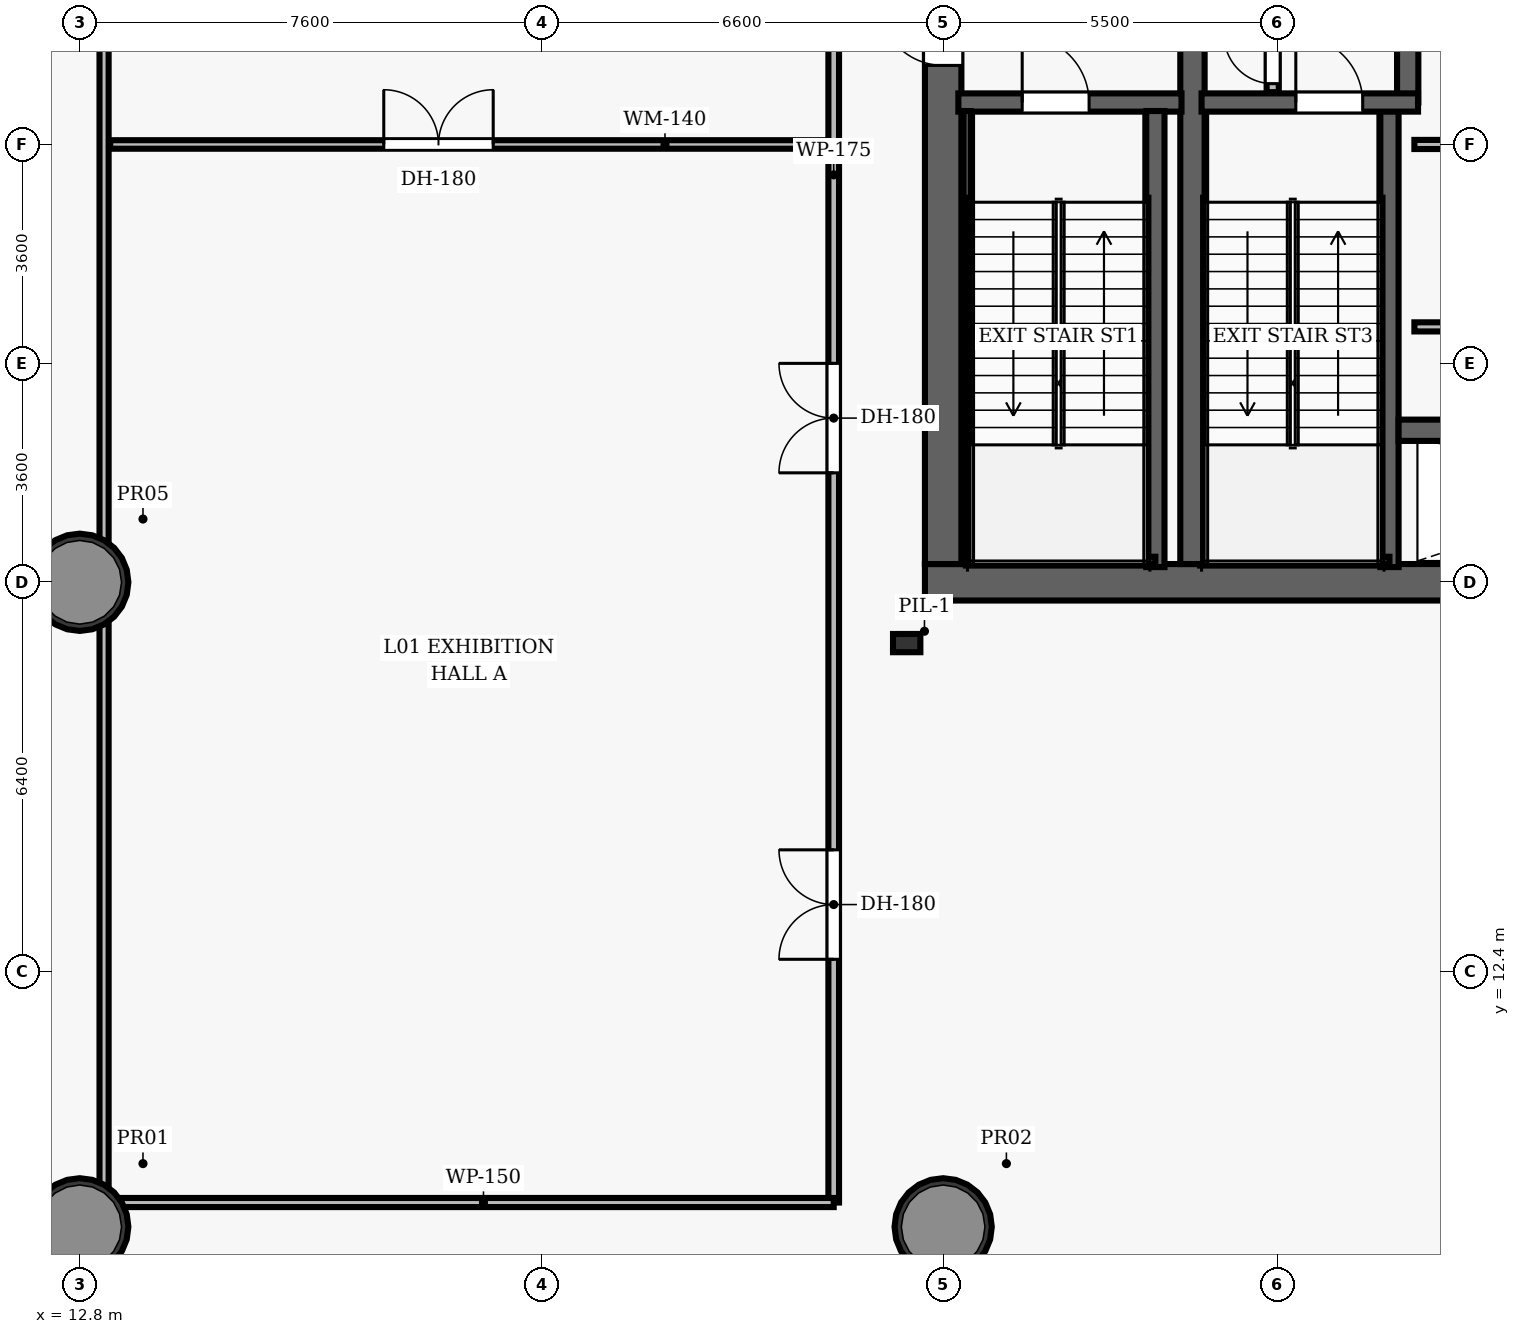
"""IFC4 building model, lengths in metres.
Left out: names, types, materials, properties, quantities, classifications, styles, units other than length and angle.
Written with IfcOpenShell. Run it as: python <this file> out.ifc"""

import sys

from ifc_helpers import new_model, si_unit, direction, frame, frame_2d, origin, origin_2d, place, context, subcontext, project, spatial, rectangle, hollow_circle, extrude, element, fill, save


model = new_model("IFC4")
c1 = context("Model", 3, precision=1e-05, world=origin(), true_north=direction((0.0, 1.0)))
c2 = subcontext(c1, "Body", "Model", "MODEL_VIEW")
j1 = project(units=[si_unit("LENGTHUNIT", "METRE"), si_unit("PLANEANGLEUNIT", "RADIAN")], contexts=[c1])
p1 = place(None, origin())
s1 = spatial("IfcSite", under=j1, at=p1, CompositionType="ELEMENT")
p2 = place(p1, origin())
s2 = spatial("IfcBuilding", under=s1, at=p2, CompositionType="ELEMENT")
p3 = place(p2, frame((0.0, 0.0, 6.6)))
s3 = spatial("IfcBuildingStorey", under=s2, at=p3, CompositionType="ELEMENT", Elevation=6.6)
p4 = place(p3, frame((26.7, 18.8, 0.0), z_axis=(0.0, 0.0, 1.0), x_axis=(1.0, 0.0, 0.0)))
e1 = element("IfcWall", 1, at=p4, inside=s3, PredefinedType="SHEAR", context=c2, shape_type="SweptSolid", body=[
    extrude(rectangle(XDim=22.6, YDim=0.6, at=frame_2d((11.3, 0.0))), origin(), (0.0, 0.0, 1.0), 5.4),
])
p5 = place(p4, frame((14.52, 0.0, 0.0)))
e2 = element("IfcOpeningElement", 2, at=p5, cuts=e1, PredefinedType="OPENING", context=c2, shape_type="SweptSolid", body=[
    extrude(rectangle(XDim=1.05, YDim=2.15, at=frame_2d((0.525, 1.075))), frame((0.0, 0.31, 0.0), z_axis=(0.0, -1.0, 0.0), x_axis=(1.0, 0.0, 0.0)), (0.0, 0.0, 1.0), 0.62),
])
p6 = place(p3, frame((27.0, 19.1, 0.0), z_axis=(0.0, 0.0, 1.0), x_axis=(0.0, 1.0, 0.0)))
e3 = element("IfcWall", 3, at=p6, inside=s3, PredefinedType="SHEAR", context=c2, shape_type="SweptSolid", body=[
    extrude(rectangle(XDim=13.8, YDim=0.6, at=frame_2d((6.9, 0.0))), origin(), (0.0, 0.0, 1.0), 5.4),
])
p7 = place(p6, frame((8.2, 0.0, 0.0)))
e4 = element("IfcOpeningElement", 4, at=p7, cuts=e3, PredefinedType="OPENING", context=c2, shape_type="SweptSolid", body=[
    extrude(rectangle(XDim=1.05, YDim=2.15, at=frame_2d((0.525, 1.075))), frame((0.0, 0.31, 0.0), z_axis=(0.0, -1.0, 0.0), x_axis=(1.0, 0.0, 0.0)), (0.0, 0.0, 1.0), 0.62),
])
p8 = place(p3, frame((31.1, 19.1, 0.0), z_axis=(0.0, 0.0, 1.0), x_axis=(0.0, 1.0, 0.0)))
e5 = element("IfcWall", 5, at=p8, inside=s3, PredefinedType="SHEAR", context=c2, shape_type="SweptSolid", body=[
    extrude(rectangle(XDim=13.8, YDim=0.4, at=frame_2d((6.9, 0.0))), origin(), (0.0, 0.0, 1.0), 5.4),
])
for number, where, z_axis, x_axis in (
    (6, (12.8, 8.2, 0.0), (0.0, 0.0, 1.0), (1.0, 0.0, 0.0)),
    (7, (27.0, 8.2, 0.0), (0.0, 0.0, 1.0), (1.0, 0.0, 0.0)),
    (8, (12.8, 18.8, 0.0), (0.0, 0.0, 1.0), (1.0, 0.0, 0.0)),
):
    element("IfcColumn", number, at=place(p3, frame(where, z_axis=z_axis, x_axis=x_axis)), inside=s3, PredefinedType="COLUMN", context=c2, shape_type="SweptSolid", body=[
        extrude(hollow_circle(Radius=0.8, WallThickness=0.06, at=origin_2d()), origin(), (0.0, 0.0, 1.0), 5.4),
    ])
p9 = place(p3, frame((27.25, 26.69, 0.0), z_axis=(0.0, 0.0, 1.0), x_axis=(1.0, 0.0, 0.0)))
e9 = element("IfcWall", 9, at=p9, inside=s3, PredefinedType="SHEAR", context=c2, shape_type="SweptSolid", body=[
    extrude(rectangle(XDim=3.67, YDim=0.3, at=frame_2d((1.835, 0.0))), origin(), (0.0, 0.0, 1.0), 5.4),
])
p10 = place(p9, frame((1.05, 0.0, 0.0)))
e10 = element("IfcOpeningElement", 10, at=p10, cuts=e9, PredefinedType="OPENING", context=c2, shape_type="SweptSolid", body=[
    extrude(rectangle(XDim=1.1, YDim=2.15, at=frame_2d((0.55, 1.075))), frame((0.0, 0.16, 0.0), z_axis=(0.0, -1.0, 0.0), x_axis=(1.0, 0.0, 0.0)), (0.0, 0.0, 1.0), 0.32),
])
p11 = place(p3, frame((30.49, 19.05, 0.0), z_axis=(0.0, 0.0, 1.0), x_axis=(0.0, 1.0, 0.0)))
e11 = element("IfcWall", 11, at=p11, inside=s3, PredefinedType="SHEAR", context=c2, shape_type="SweptSolid", body=[
    extrude(rectangle(XDim=7.5, YDim=0.3, at=frame_2d((3.75, 0.0))), origin(), (0.0, 0.0, 1.0), 5.4),
])
p12 = place(p3, frame((27.395, 19.1, 0.0), z_axis=(0.0, 0.0, 1.0), x_axis=(0.0, 1.0, 0.0)))
e12 = element("IfcWall", 12, at=p12, inside=s3, PredefinedType="SHEAR", context=c2, shape_type="SweptSolid", body=[
    extrude(rectangle(XDim=7.45, YDim=0.12, at=frame_2d((3.725, 0.0))), origin(), (0.0, 0.0, 1.0), 5.4),
])
p13 = place(p3, frame((27.395, 19.16, 0.0), z_axis=(0.0, 0.0, 1.0), x_axis=(1.0, 0.0, 0.0)))
e13 = element("IfcWall", 13, at=p13, inside=s3, PredefinedType="SHEAR", context=c2, shape_type="SweptSolid", body=[
    extrude(rectangle(XDim=3.095, YDim=0.12, at=frame_2d((1.547, 0.0))), origin(), (0.0, 0.0, 1.0), 5.4),
])
p14 = place(p3, frame((34.34, 19.05, 0.0), z_axis=(0.0, 0.0, 1.0), x_axis=(0.0, 1.0, 0.0)))
e14 = element("IfcWall", 14, at=p14, inside=s3, PredefinedType="SHEAR", context=c2, shape_type="SweptSolid", body=[
    extrude(rectangle(XDim=7.5, YDim=0.3, at=frame_2d((3.75, 0.0))), origin(), (0.0, 0.0, 1.0), 5.4),
])
p15 = place(p3, frame((34.64, 26.69, 0.0), z_axis=(0.0, 0.0, 1.0), x_axis=(0.0, 1.0, 0.0)))
e15 = element("IfcWall", 15, at=p15, inside=s3, PredefinedType="SHEAR", context=c2, shape_type="SweptSolid", body=[
    extrude(rectangle(XDim=6.26, YDim=0.35, at=frame_2d((3.13, 0.0))), origin(), (0.0, 0.0, 1.0), 5.4),
])
p16 = place(p3, frame((31.25, 26.69, 0.0), z_axis=(0.0, 0.0, 1.0), x_axis=(1.0, 0.0, 0.0)))
e16 = element("IfcWall", 16, at=p16, inside=s3, PredefinedType="SHEAR", context=c2, shape_type="SweptSolid", body=[
    extrude(rectangle(XDim=3.56, YDim=0.3, at=frame_2d((1.78, 0.0))), origin(), (0.0, 0.0, 1.0), 5.4),
])
p17 = place(p16, frame((1.55, 0.0, 0.0)))
e17 = element("IfcOpeningElement", 17, at=p17, cuts=e16, PredefinedType="OPENING", context=c2, shape_type="SweptSolid", body=[
    extrude(rectangle(XDim=1.1, YDim=2.15, at=frame_2d((0.55, 1.075))), frame((0.0, 0.16, 0.0), z_axis=(0.0, -1.0, 0.0), x_axis=(1.0, 0.0, 0.0)), (0.0, 0.0, 1.0), 0.32),
])
p18 = place(p3, frame((31.3, 19.16, 0.0), z_axis=(0.0, 0.0, 1.0), x_axis=(1.0, 0.0, 0.0)))
e18 = element("IfcWall", 18, at=p18, inside=s3, PredefinedType="SHEAR", context=c2, shape_type="SweptSolid", body=[
    extrude(rectangle(XDim=3.04, YDim=0.12, at=frame_2d((1.52, 0.0))), origin(), (0.0, 0.0, 1.0), 5.4),
])
p19 = place(p3, frame((32.42, 26.86, 0.0), z_axis=(0.0, 0.0, 1.0), x_axis=(0.0, 1.0, 0.0)))
e19 = element("IfcWall", 19, at=p19, inside=s3, PredefinedType="PARTITIONING", context=c2, shape_type="SweptSolid", body=[
    extrude(rectangle(XDim=2.04, YDim=0.2, at=frame_2d((1.02, 0.0))), origin(), (0.0, 0.0, 1.0), 4.11),
])
p20 = place(p19, frame((0.14, 0.0, 0.0)))
e20 = element("IfcOpeningElement", 20, at=p20, cuts=e19, PredefinedType="OPENING", context=c2, shape_type="SweptSolid", body=[
    extrude(rectangle(XDim=0.8, YDim=2.05, at=frame_2d((0.4, 1.025))), frame((0.0, 0.11, 0.0), z_axis=(0.0, -1.0, 0.0), x_axis=(1.0, 0.0, 0.0)), (0.0, 0.0, 1.0), 0.22),
])
p21 = place(p3, frame((34.49, 21.3, 0.0), z_axis=(0.0, 0.0, 1.0), x_axis=(1.0, 0.0, 0.0)))
e21 = element("IfcWall", 21, at=p21, inside=s3, PredefinedType="SHEAR", context=c2, shape_type="SweptSolid", body=[
    extrude(rectangle(XDim=6.68, YDim=0.35, at=frame_2d((3.34, 0.0))), origin(), (0.0, 0.0, 1.0), 4.11),
])
for number, where, z_axis, x_axis in (
    (22, (34.75, 23.0, 0.0), (0.0, 0.0, 1.0), (1.0, 0.0, 0.0)),
    (23, (34.75, 26.0, 0.0), (0.0, 0.0, 1.0), (1.0, 0.0, 0.0)),
):
    element("IfcWall", number, at=place(p3, frame(where, z_axis=z_axis, x_axis=x_axis)), inside=s3, PredefinedType="PARTITIONING", context=c2, shape_type="SweptSolid", body=[
        extrude(rectangle(XDim=6.25, YDim=0.15, at=frame_2d((3.125, 0.0))), origin(), (0.0, 0.0, 1.0), 4.11),
    ])
p22 = place(p3, frame((26.4, 17.8, 0.0), z_axis=(0.0, 0.0, 1.0), x_axis=(1.0, 0.0, 0.0)))
e24 = element("IfcColumn", 24, at=p22, inside=s3, PredefinedType="PILASTER", context=c2, shape_type="SweptSolid", body=[
    extrude(rectangle(XDim=0.45, YDim=0.3, at=origin_2d()), origin(), (0.0, 0.0, 1.0), 5.4),
])
p23 = place(p3, frame((25.2, 8.6, 0.0), z_axis=(0.0, 0.0, 1.0), x_axis=(0.0, 1.0, 0.0)))
e25 = element("IfcWall", 25, at=p23, inside=s3, PredefinedType="PARTITIONING", context=c2, shape_type="SweptSolid", body=[
    extrude(rectangle(XDim=34.8, YDim=0.175, at=frame_2d((17.4, 0.0))), origin(), (0.0, 0.0, 1.0), 4.11),
])
p24 = place(p23, frame((4.0, 0.0, 0.0)))
e26 = element("IfcOpeningElement", 26, at=p24, cuts=e25, PredefinedType="OPENING", context=c2, shape_type="SweptSolid", body=[
    extrude(rectangle(XDim=1.8, YDim=2.35, at=frame_2d((0.9, 1.175))), frame((0.0, 0.097, 0.0), z_axis=(0.0, -1.0, 0.0), x_axis=(1.0, 0.0, 0.0)), (0.0, 0.0, 1.0), 0.195),
])
p25 = place(p23, frame((12.0, 0.0, 0.0)))
e27 = element("IfcOpeningElement", 27, at=p25, cuts=e25, PredefinedType="OPENING", context=c2, shape_type="SweptSolid", body=[
    extrude(rectangle(XDim=1.8, YDim=2.35, at=frame_2d((0.9, 1.175))), frame((0.0, 0.097, 0.0), z_axis=(0.0, -1.0, 0.0), x_axis=(1.0, 0.0, 0.0)), (0.0, 0.0, 1.0), 0.195),
])
p26 = place(p23, frame((20.0, 0.0, 0.0)))
e28 = element("IfcOpeningElement", 28, at=p26, cuts=e25, PredefinedType="OPENING", context=c2, shape_type="SweptSolid", body=[
    extrude(rectangle(XDim=1.8, YDim=2.35, at=frame_2d((0.9, 1.175))), frame((0.0, 0.097, 0.0), z_axis=(0.0, -1.0, 0.0), x_axis=(1.0, 0.0, 0.0)), (0.0, 0.0, 1.0), 0.195),
])
p27 = place(p23, frame((28.0, 0.0, 0.0)))
e29 = element("IfcOpeningElement", 29, at=p27, cuts=e25, PredefinedType="OPENING", context=c2, shape_type="SweptSolid", body=[
    extrude(rectangle(XDim=1.8, YDim=2.35, at=frame_2d((0.9, 1.175))), frame((0.0, 0.097, 0.0), z_axis=(0.0, -1.0, 0.0), x_axis=(1.0, 0.0, 0.0)), (0.0, 0.0, 1.0), 0.195),
])
p28 = place(p3, frame((13.2, 8.6, 0.0), z_axis=(0.0, 0.0, 1.0), x_axis=(1.0, 0.0, 0.0)))
e30 = element("IfcWall", 30, at=p28, inside=s3, PredefinedType="PARTITIONING", context=c2, shape_type="SweptSolid", body=[
    extrude(rectangle(XDim=12.0, YDim=0.15, at=frame_2d((6.0, 0.0))), origin(), (0.0, 0.0, 1.0), 4.11),
])
p29 = place(p3, frame((13.2, 8.6, 0.0), z_axis=(0.0, 0.0, 1.0), x_axis=(0.0, 1.0, 0.0)))
e31 = element("IfcWall", 31, at=p29, inside=s3, PredefinedType="PARTITIONING", context=c2, shape_type="SweptSolid", body=[
    extrude(rectangle(XDim=34.8, YDim=0.15, at=frame_2d((17.4, 0.0))), origin(), (0.0, 0.0, 1.0), 4.11),
])
p30 = place(p3, frame((13.3, 26.0, 0.0), z_axis=(0.0, 0.0, 1.0), x_axis=(1.0, 0.0, 0.0)))
e32 = element("IfcWall", 32, at=p30, inside=s3, PredefinedType="MOVABLE", context=c2, shape_type="SweptSolid", body=[
    extrude(rectangle(XDim=11.8, YDim=0.14, at=frame_2d((5.9, 0.0))), origin(), (0.0, 0.0, 1.0), 4.11),
])
p31 = place(p30, frame((4.5, 0.0, 0.0)))
e33 = element("IfcOpeningElement", 33, at=p31, cuts=e32, PredefinedType="OPENING", context=c2, shape_type="SweptSolid", body=[
    extrude(rectangle(XDim=1.8, YDim=2.35, at=frame_2d((0.9, 1.175))), frame((0.0, 0.08, 0.0), z_axis=(0.0, -1.0, 0.0), x_axis=(1.0, 0.0, 0.0)), (0.0, 0.0, 1.0), 0.16),
])
p32 = place(p10, origin())
e34 = element("IfcDoor", 34, at=p32, inside=s3, OperationType="SINGLE_SWING_LEFT", PredefinedType="DOOR", context=c2, shape_type="SweptSolid", body=[
    extrude(rectangle(XDim=1.1, YDim=2.15, at=frame_2d((0.55, 1.075))), frame((0.0, 0.025, 0.0), z_axis=(0.0, -1.0, 0.0), x_axis=(1.0, 0.0, 0.0)), (0.0, 0.0, 1.0), 0.05),
])
fill(e10, e34)
p33 = place(p7, origin())
e35 = element("IfcDoor", 35, at=p33, inside=s3, OperationType="SINGLE_SWING_RIGHT", PredefinedType="DOOR", context=c2, shape_type="SweptSolid", body=[
    extrude(rectangle(XDim=1.05, YDim=2.15, at=frame_2d((0.525, 1.075))), frame((0.0, 0.025, 0.0), z_axis=(0.0, -1.0, 0.0), x_axis=(1.0, 0.0, 0.0)), (0.0, 0.0, 1.0), 0.05),
])
fill(e4, e35)
p34 = place(p17, origin())
e36 = element("IfcDoor", 36, at=p34, inside=s3, OperationType="SINGLE_SWING_LEFT", PredefinedType="DOOR", context=c2, shape_type="SweptSolid", body=[
    extrude(rectangle(XDim=1.1, YDim=2.15, at=frame_2d((0.55, 1.075))), frame((0.0, 0.025, 0.0), z_axis=(0.0, -1.0, 0.0), x_axis=(1.0, 0.0, 0.0)), (0.0, 0.0, 1.0), 0.05),
])
fill(e17, e36)
p35 = place(p20, origin())
e37 = element("IfcDoor", 37, at=p35, inside=s3, OperationType="SINGLE_SWING_RIGHT", PredefinedType="DOOR", context=c2, shape_type="SweptSolid", body=[
    extrude(rectangle(XDim=0.8, YDim=2.05, at=frame_2d((0.4, 1.025))), frame((0.0, 0.025, 0.0), z_axis=(0.0, -1.0, 0.0), x_axis=(1.0, 0.0, 0.0)), (0.0, 0.0, 1.0), 0.05),
])
fill(e20, e37)
p36 = place(p31, origin())
e38 = element("IfcDoor", 38, at=p36, inside=s3, OperationType="DOUBLE_DOOR_SINGLE_SWING", PredefinedType="DOOR", context=c2, shape_type="SweptSolid", body=[
    extrude(rectangle(XDim=1.8, YDim=2.35, at=frame_2d((0.9, 1.175))), frame((0.0, 0.025, 0.0), z_axis=(0.0, -1.0, 0.0), x_axis=(1.0, 0.0, 0.0)), (0.0, 0.0, 1.0), 0.05),
])
fill(e33, e38)
p37 = place(p24, origin())
e39 = element("IfcDoor", 39, at=p37, inside=s3, OperationType="DOUBLE_DOOR_SINGLE_SWING", PredefinedType="DOOR", context=c2, shape_type="SweptSolid", body=[
    extrude(rectangle(XDim=1.8, YDim=2.35, at=frame_2d((0.9, 1.175))), frame((0.0, 0.025, 0.0), z_axis=(0.0, -1.0, 0.0), x_axis=(1.0, 0.0, 0.0)), (0.0, 0.0, 1.0), 0.05),
])
fill(e26, e39)
p38 = place(p25, origin())
e40 = element("IfcDoor", 40, at=p38, inside=s3, OperationType="DOUBLE_DOOR_SINGLE_SWING", PredefinedType="DOOR", context=c2, shape_type="SweptSolid", body=[
    extrude(rectangle(XDim=1.8, YDim=2.35, at=frame_2d((0.9, 1.175))), frame((0.0, 0.025, 0.0), z_axis=(0.0, -1.0, 0.0), x_axis=(1.0, 0.0, 0.0)), (0.0, 0.0, 1.0), 0.05),
])
fill(e27, e40)
save(model, sys.argv[1])
